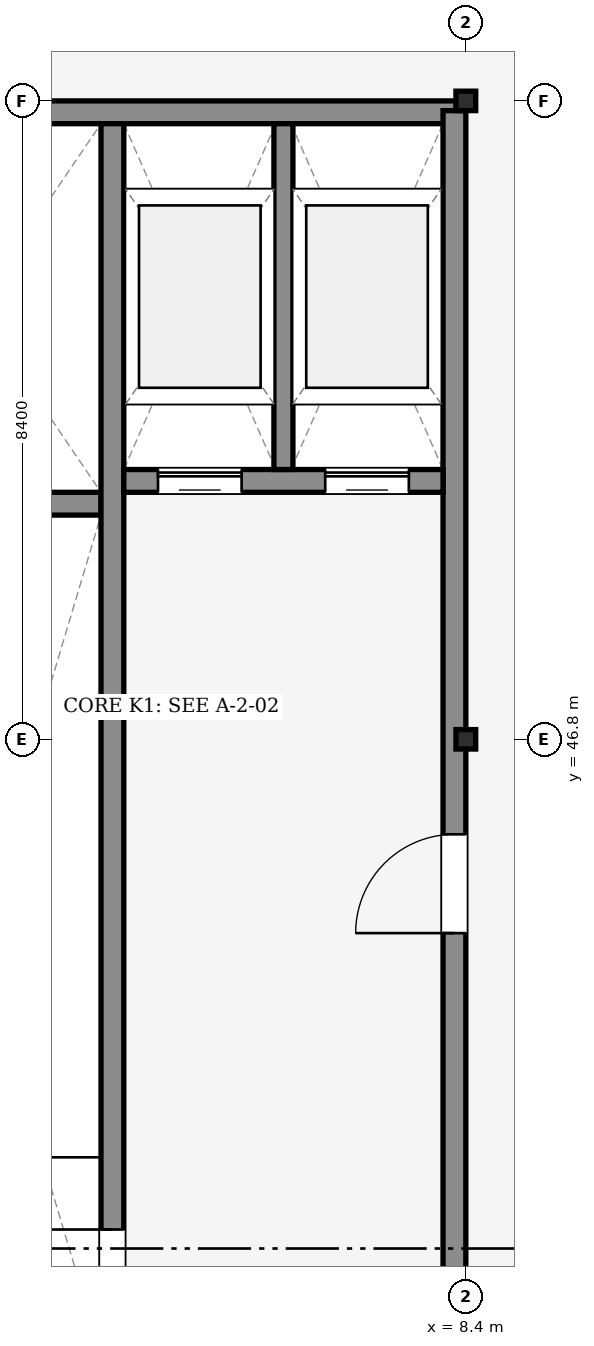
"""IFC4 building model, lengths in metres.
Left out: names, types, materials, properties, quantities, classifications, styles, units other than length and angle.
Written with IfcOpenShell. Run it as: python <this file> out.ifc"""

import sys

from ifc_helpers import new_model, si_unit, direction, frame, frame_2d, origin, origin_2d, place, context, subcontext, project, spatial, rectangle, i_section, extrude, element, fill, save


model = new_model("IFC4")
c1 = context("Model", 3, precision=1e-05, world=origin(), true_north=direction((0.0, 1.0)))
c2 = subcontext(c1, "Body", "Model", "MODEL_VIEW")
j1 = project(units=[si_unit("LENGTHUNIT", "METRE"), si_unit("PLANEANGLEUNIT", "RADIAN")], contexts=[c1])
p1 = place(None, origin())
s1 = spatial("IfcSite", under=j1, at=p1, CompositionType="ELEMENT")
p2 = place(p1, origin())
s2 = spatial("IfcBuilding", under=s1, at=p2, CompositionType="ELEMENT")
p3 = place(p2, frame((0.0, 0.0, 23.4)))
s3 = spatial("IfcBuildingStorey", under=s2, at=p3, CompositionType="ELEMENT", Elevation=23.4)
for number, where, z_axis, x_axis in (
    (1, (8.4, 46.8, 0.0), (0.0, 0.0, 1.0), (1.0, 0.0, 0.0)),
    (2, (8.4, 55.2, 0.0), (0.0, 0.0, 1.0), (1.0, 0.0, 0.0)),
):
    element("IfcColumn", number, at=place(p3, frame(where, z_axis=z_axis, x_axis=x_axis)), inside=s3, PredefinedType="COLUMN", context=c2, shape_type="SweptSolid", body=[
        extrude(i_section(OverallWidth=0.256, OverallDepth=0.26, WebThickness=0.01, FlangeThickness=0.017, FilletRadius=0.013, at=origin_2d()), origin(), (0.0, 0.0, 1.0), 5.4),
    ])
p4 = place(p3, frame((0.126, 55.05, 0.0), z_axis=(0.0, 0.0, 1.0), x_axis=(1.0, 0.0, 0.0)))
e3 = element("IfcWall", 3, at=p4, inside=s3, PredefinedType="SHEAR", context=c2, shape_type="SweptSolid", body=[
    extrude(rectangle(XDim=8.148, YDim=0.3, at=frame_2d((4.074, 0.0))), origin(), (0.0, 0.0, 1.0), 5.17),
])
p5 = place(p3, frame((0.3, 49.9, 0.0), z_axis=(0.0, 0.0, 1.0), x_axis=(1.0, 0.0, 0.0)))
e4 = element("IfcWall", 4, at=p5, inside=s3, PredefinedType="SHEAR", context=c2, shape_type="SweptSolid", body=[
    extrude(rectangle(XDim=3.3, YDim=0.3, at=frame_2d((1.65, 0.0))), origin(), (0.0, 0.0, 1.0), 5.17),
])
p6 = place(p3, frame((8.25, 38.528, 0.0), z_axis=(0.0, 0.0, 1.0), x_axis=(0.0, 1.0, 0.0)))
e5 = element("IfcWall", 5, at=p6, inside=s3, PredefinedType="SHEAR", context=c2, shape_type="SweptSolid", body=[
    extrude(rectangle(XDim=16.544, YDim=0.3, at=frame_2d((8.272, 0.0))), origin(), (0.0, 0.0, 1.0), 5.17),
])
p7 = place(p6, frame((5.722, 0.0, 0.0)))
e6 = element("IfcOpeningElement", 6, at=p7, cuts=e5, PredefinedType="OPENING", context=c2, shape_type="SweptSolid", body=[
    extrude(rectangle(XDim=1.3, YDim=2.2, at=frame_2d((0.65, 1.1))), frame((0.0, 0.16, 0.0), z_axis=(0.0, -1.0, 0.0), x_axis=(1.0, 0.0, 0.0)), (0.0, 0.0, 1.0), 0.32),
])
p8 = place(p3, frame((3.75, 38.7, 0.0), z_axis=(0.0, 0.0, 1.0), x_axis=(0.0, 1.0, 0.0)))
e7 = element("IfcWall", 7, at=p8, inside=s3, PredefinedType="SHEAR", context=c2, shape_type="SweptSolid", body=[
    extrude(rectangle(XDim=16.2, YDim=0.3, at=frame_2d((8.1, 0.0))), origin(), (0.0, 0.0, 1.0), 5.17),
])
p9 = place(p8, frame((0.5, 0.0, 0.0)))
e8 = element("IfcOpeningElement", 8, at=p9, cuts=e7, PredefinedType="OPENING", context=c2, shape_type="SweptSolid", body=[
    extrude(rectangle(XDim=1.15, YDim=2.15, at=frame_2d((0.575, 1.075))), frame((0.0, 0.16, 0.0), z_axis=(0.0, -1.0, 0.0), x_axis=(1.0, 0.0, 0.0)), (0.0, 0.0, 1.0), 0.32),
])
p10 = place(p3, frame((3.9, 50.2, 0.0), z_axis=(0.0, 0.0, 1.0), x_axis=(1.0, 0.0, 0.0)))
e9 = element("IfcWall", 9, at=p10, inside=s3, PredefinedType="SHEAR", context=c2, shape_type="SweptSolid", body=[
    extrude(rectangle(XDim=4.2, YDim=0.3, at=frame_2d((2.1, 0.0))), origin(), (0.0, 0.0, 1.0), 5.17),
])
p11 = place(p10, frame((0.45, 0.0, 0.0)))
e10 = element("IfcOpeningElement", 10, at=p11, cuts=e9, PredefinedType="OPENING", context=c2, shape_type="SweptSolid", body=[
    extrude(rectangle(XDim=1.1, YDim=2.2, at=frame_2d((0.55, 1.1))), frame((0.0, 0.16, 0.0), z_axis=(0.0, -1.0, 0.0), x_axis=(1.0, 0.0, 0.0)), (0.0, 0.0, 1.0), 0.32),
])
p12 = place(p10, frame((2.65, 0.0, 0.0)))
e11 = element("IfcOpeningElement", 11, at=p12, cuts=e9, PredefinedType="OPENING", context=c2, shape_type="SweptSolid", body=[
    extrude(rectangle(XDim=1.1, YDim=2.2, at=frame_2d((0.55, 1.1))), frame((0.0, 0.16, 0.0), z_axis=(0.0, -1.0, 0.0), x_axis=(1.0, 0.0, 0.0)), (0.0, 0.0, 1.0), 0.32),
])
p13 = place(p3, frame((6.0, 50.35, 0.0), z_axis=(0.0, 0.0, 1.0), x_axis=(0.0, 1.0, 0.0)))
e12 = element("IfcWall", 12, at=p13, inside=s3, PredefinedType="PARTITIONING", context=c2, shape_type="SweptSolid", body=[
    extrude(rectangle(XDim=4.55, YDim=0.25, at=frame_2d((2.275, 0.0))), origin(), (0.0, 0.0, 1.0), 3.785),
])
p14 = place(p7, origin())
e13 = element("IfcDoor", 13, at=p14, inside=s3, OperationType="SINGLE_SWING_LEFT", PredefinedType="DOOR", context=c2, shape_type="SweptSolid", body=[
    extrude(rectangle(XDim=1.3, YDim=2.2, at=frame_2d((0.65, 1.1))), frame((0.0, 0.025, 0.0), z_axis=(0.0, -1.0, 0.0), x_axis=(1.0, 0.0, 0.0)), (0.0, 0.0, 1.0), 0.05),
])
fill(e6, e13)
p15 = place(p9, frame((1.15, 0.0, 0.0), z_axis=(0.0, 0.0, 1.0), x_axis=(-1.0, 0.0, 0.0)))
e14 = element("IfcDoor", 14, at=p15, inside=s3, OperationType="SINGLE_SWING_LEFT", PredefinedType="DOOR", context=c2, shape_type="SweptSolid", body=[
    extrude(rectangle(XDim=1.15, YDim=2.15, at=frame_2d((0.575, 1.075))), frame((0.0, 0.025, 0.0), z_axis=(0.0, -1.0, 0.0), x_axis=(1.0, 0.0, 0.0)), (0.0, 0.0, 1.0), 0.05),
])
fill(e8, e14)
p16 = place(p11, origin())
e15 = element("IfcDoor", 15, at=p16, inside=s3, OperationType="SLIDING_TO_LEFT", PredefinedType="DOOR", context=c2, shape_type="SweptSolid", body=[
    extrude(rectangle(XDim=1.1, YDim=2.2, at=frame_2d((0.55, 1.1))), frame((0.0, 0.025, 0.0), z_axis=(0.0, -1.0, 0.0), x_axis=(1.0, 0.0, 0.0)), (0.0, 0.0, 1.0), 0.05),
])
fill(e10, e15)
p17 = place(p12, origin())
e16 = element("IfcDoor", 16, at=p17, inside=s3, OperationType="SLIDING_TO_LEFT", PredefinedType="DOOR", context=c2, shape_type="SweptSolid", body=[
    extrude(rectangle(XDim=1.1, YDim=2.2, at=frame_2d((0.55, 1.1))), frame((0.0, 0.025, 0.0), z_axis=(0.0, -1.0, 0.0), x_axis=(1.0, 0.0, 0.0)), (0.0, 0.0, 1.0), 0.05),
])
fill(e11, e16)
save(model, sys.argv[1])
